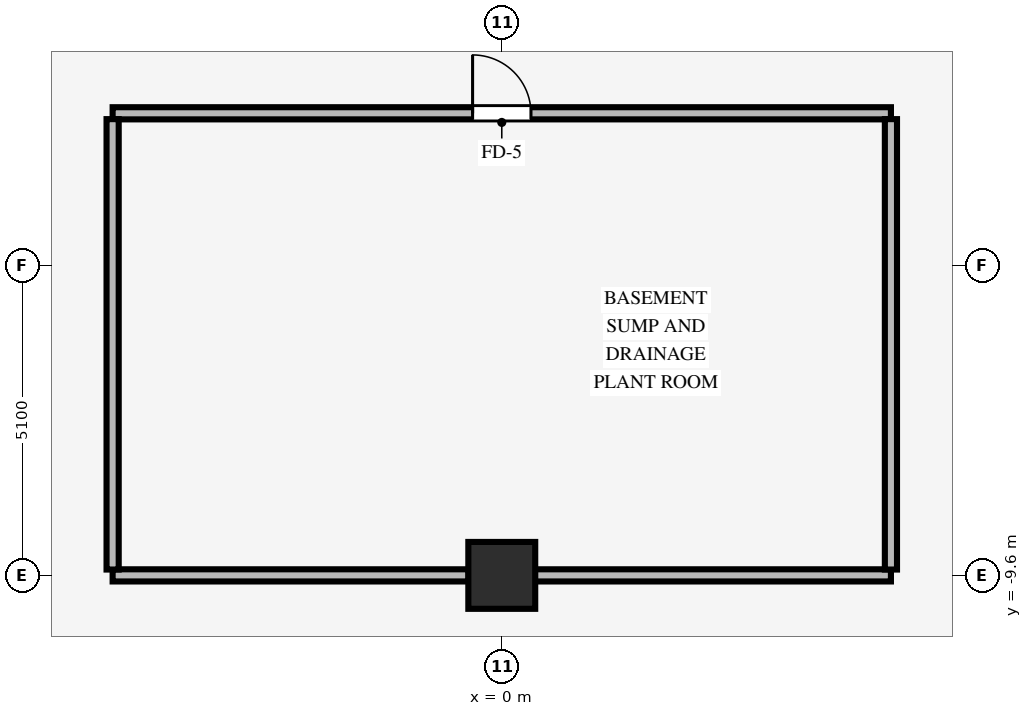
"""IFC4 building model, lengths in metres.
Left out: names, types, materials, properties, quantities, classifications, styles, units other than length and angle.
Written with IfcOpenShell. Run it as: python <this file> out.ifc"""

import sys

from ifc_helpers import new_model, si_unit, direction, frame, frame_2d, origin, origin_2d, place, context, subcontext, project, spatial, rectangle, extrude, source, transform, mapped, element, fill, save


model = new_model("IFC4")
c1 = context("Model", 3, precision=1e-05, world=origin(), true_north=direction((0.0, 1.0)))
c2 = subcontext(c1, "Body", "Model", "MODEL_VIEW")
j1 = project(units=[si_unit("LENGTHUNIT", "METRE"), si_unit("PLANEANGLEUNIT", "RADIAN")], contexts=[c1])
p1 = place(None, origin())
s1 = spatial("IfcSite", under=j1, at=p1, CompositionType="ELEMENT")
p2 = place(p1, origin())
s2 = spatial("IfcBuilding", under=s1, at=p2, CompositionType="ELEMENT")
p3 = place(p2, frame((0.0, 0.0, -8.4)))
s3 = spatial("IfcBuildingStorey", under=s2, at=p3, CompositionType="ELEMENT", Elevation=-8.4)
p4 = place(p3, frame((0.0, -9.6, 0.0), z_axis=(0.0, 0.0, 1.0), x_axis=(1.0, 0.0, 0.0)))
e1 = element("IfcColumn", 1, at=p4, inside=s3, PredefinedType="COLUMN", context=c2, shape_type="SweptSolid", body=[
    extrude(rectangle(XDim=1.1, YDim=1.1, at=origin_2d()), origin(), (0.0, 0.0, 1.0), 3.85),
])
for number, where, z_axis, x_axis in (
    (2, (-6.4, -9.6, 0.0), (0.0, 0.0, 1.0), (1.0, 0.0, 0.0)),
    (3, (0.546, -9.6, 0.0), (0.0, 0.0, 1.0), (1.0, 0.0, 0.0)),
):
    element("IfcWall", number, at=place(p3, frame(where, z_axis=z_axis, x_axis=x_axis)), inside=s3, PredefinedType="STANDARD", context=c2, shape_type="SweptSolid", body=[
        extrude(rectangle(XDim=5.854, YDim=0.2, at=frame_2d((2.927, 0.0))), origin(), (0.0, 0.0, 1.0), 3.085),
    ])
p5 = place(p3, frame((-6.4, -2.0, 0.0), z_axis=(0.0, 0.0, 1.0), x_axis=(1.0, 0.0, 0.0)))
e4 = element("IfcWall", 4, at=p5, inside=s3, PredefinedType="STANDARD", context=c2, shape_type="SweptSolid", body=[
    extrude(rectangle(XDim=12.8, YDim=0.2, at=frame_2d((6.4, 0.0))), origin(), (0.0, 0.0, 1.0), 3.84),
])
p6 = place(p5, frame((5.92, 0.0, 0.0)))
e5 = element("IfcOpeningElement", 5, at=p6, cuts=e4, PredefinedType="OPENING", context=c2, shape_type="SweptSolid", body=[
    extrude(rectangle(XDim=0.96, YDim=2.1, at=frame_2d((0.48, 1.05))), frame((0.0, 0.11, 0.0), z_axis=(0.0, -1.0, 0.0), x_axis=(1.0, 0.0, 0.0)), (0.0, 0.0, 1.0), 0.22),
])
for number, where, z_axis, x_axis in (
    (6, (-6.4, -9.504, 0.0), (0.0, 0.0, 1.0), (0.0, 1.0, 0.0)),
    (7, (6.4, -9.504, 0.0), (0.0, 0.0, 1.0), (0.0, 1.0, 0.0)),
):
    element("IfcWall", number, at=place(p3, frame(where, z_axis=z_axis, x_axis=x_axis)), inside=s3, PredefinedType="STANDARD", context=c2, shape_type="SweptSolid", body=[
        extrude(rectangle(XDim=7.408, YDim=0.2, at=frame_2d((3.704, 0.0))), origin(), (0.0, 0.0, 1.0), 3.84),
    ])
m1 = source(origin(), c2, "Body", "SweptSolid", [
    extrude(rectangle(XDim=0.96, YDim=2.1, at=frame_2d((0.48, 1.05))), frame((0.0, 0.025, 0.0), z_axis=(0.0, -1.0, 0.0), x_axis=(1.0, 0.0, 0.0)), (0.0, 0.0, 1.0), 0.05),
])
p7 = place(p6, origin())
e8 = element("IfcDoor", 8, at=p7, inside=s3, OperationType="SINGLE_SWING_LEFT", PredefinedType="DOOR", context=c2, shape_type="MappedRepresentation", body=[
    mapped(m1, transform((0.0, 0.0, 0.0), scale=1.0)),
])
fill(e5, e8)
save(model, sys.argv[1])
